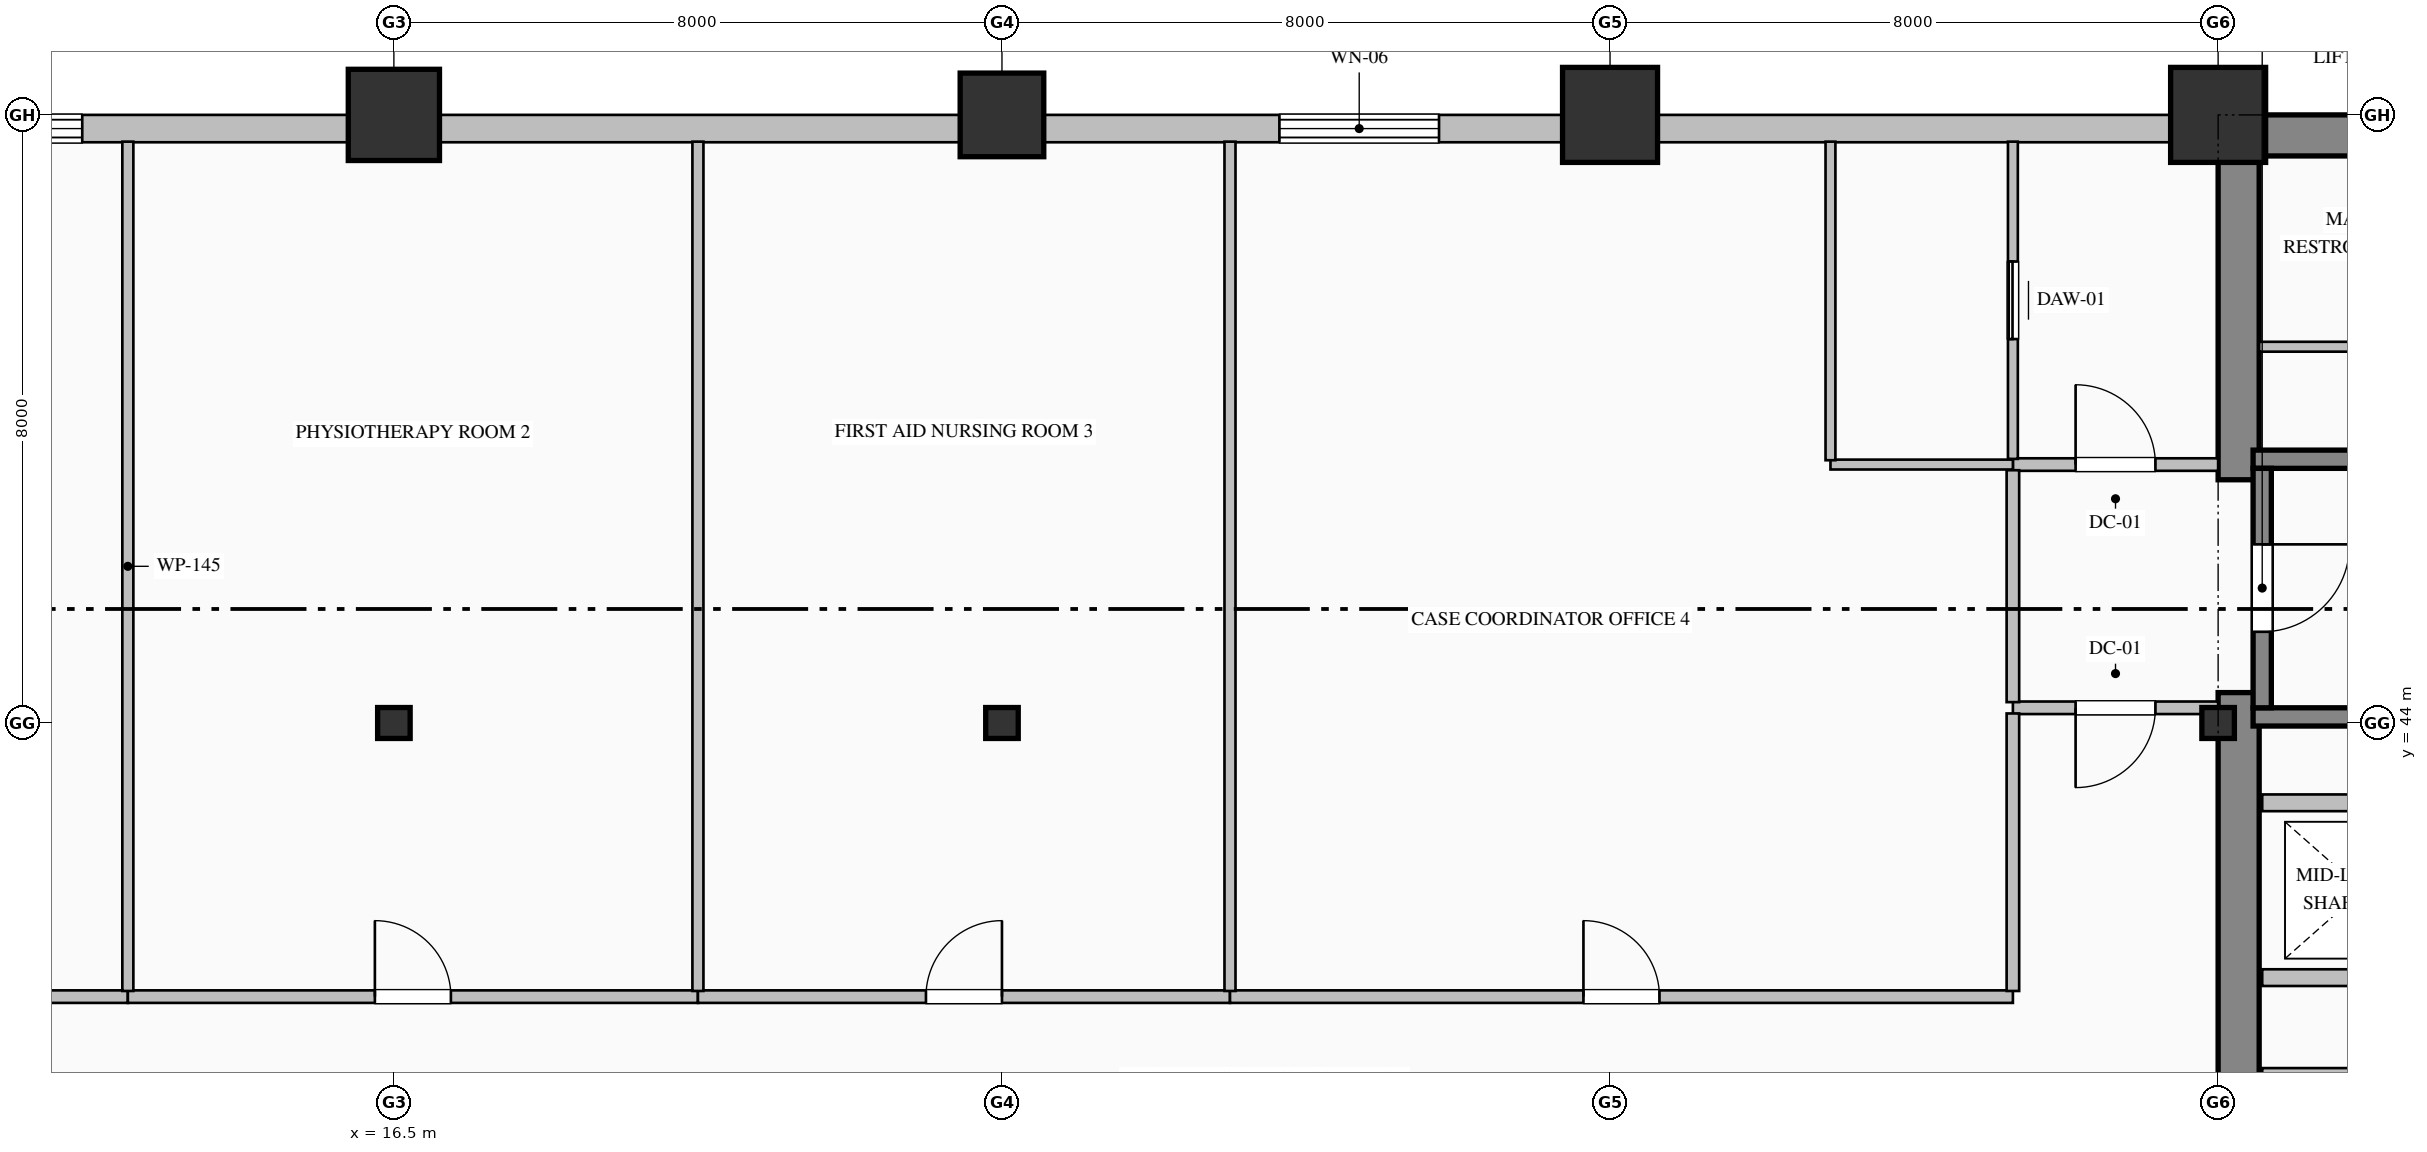
"""IFC4 building model, lengths in metres.
Left out: names, types, materials, properties, quantities, classifications, styles, units other than length and angle.
Written with IfcOpenShell. Run it as: python <this file> out.ifc"""

import sys

from ifc_helpers import new_model, si_unit, direction, frame, frame_2d, origin, origin_2d, place, context, subcontext, project, spatial, rectangle, hollow_rectangle, hollow_circle, i_section, extrude, element, fill, save


model = new_model("IFC4")
c1 = context("Model", 3, precision=1e-05, world=origin(), true_north=direction((0.0, 1.0)))
c2 = subcontext(c1, "Body", "Model", "MODEL_VIEW")
j1 = project(units=[si_unit("LENGTHUNIT", "METRE"), si_unit("PLANEANGLEUNIT", "RADIAN")], contexts=[c1])
p1 = place(None, origin())
s1 = spatial("IfcSite", under=j1, at=p1, CompositionType="ELEMENT")
p2 = place(p1, origin())
s2 = spatial("IfcBuilding", under=s1, at=p2, CompositionType="ELEMENT")
p3 = place(p2, frame((0.0, 0.0, 84.2)))
s3 = spatial("IfcBuildingStorey", under=s2, at=p3, CompositionType="ELEMENT", Elevation=84.2)
p4 = place(p3, frame((40.5, 51.73, 0.0), z_axis=(0.0, 0.0, 1.0), x_axis=(1.0, 0.0, 0.0)))
e1 = element("IfcWall", 1, at=p4, inside=s3, PredefinedType="SHEAR", context=c2, shape_type="SweptSolid", body=[
    extrude(rectangle(XDim=23.5, YDim=0.54, at=frame_2d((11.75, 0.0))), origin(), (0.0, 0.0, 1.0), 3.75),
])
p5 = place(p3, frame((40.77, 36.54, 0.0), z_axis=(0.0, 0.0, 1.0), x_axis=(0.0, 1.0, 0.0)))
e2 = element("IfcWall", 2, at=p5, inside=s3, PredefinedType="SHEAR", context=c2, shape_type="SweptSolid", body=[
    extrude(rectangle(XDim=7.86, YDim=0.54, at=frame_2d((3.93, 0.0))), origin(), (0.0, 0.0, 1.0), 3.75),
])
p6 = place(p3, frame((40.77, 47.2, 0.0), z_axis=(0.0, 0.0, 1.0), x_axis=(0.0, 1.0, 0.0)))
e3 = element("IfcWall", 3, at=p6, inside=s3, PredefinedType="SHEAR", context=c2, shape_type="SweptSolid", body=[
    extrude(rectangle(XDim=4.26, YDim=0.54, at=frame_2d((2.13, 0.0))), origin(), (0.0, 0.0, 1.0), 3.75),
])
p7 = place(p3, frame((16.5, 44.0, 0.0), z_axis=(0.0, 0.0, 1.0), x_axis=(1.0, 0.0, 0.0)))
e4 = element("IfcColumn", 4, at=p7, inside=s3, PredefinedType="COLUMN", context=c2, shape_type="SweptSolid", body=[
    extrude(i_section(OverallWidth=0.407, OverallDepth=0.428, WebThickness=0.02, FlangeThickness=0.035, FilletRadius=0.022, at=origin_2d()), origin(), (0.0, 0.0, 1.0), 4.0),
])
p8 = place(p3, frame((16.5, 52.0, 0.0), z_axis=(0.0, 0.0, 1.0), x_axis=(1.0, 0.0, 0.0)))
e5 = element("IfcColumn", 5, at=p8, inside=s3, PredefinedType="COLUMN", context=c2, shape_type="SweptSolid", body=[
    extrude(hollow_circle(Radius=0.6, WallThickness=0.04, at=origin_2d()), origin(), (0.0, 0.0, 1.0), 4.0),
])
p9 = place(p3, frame((24.5, 44.0, 0.0), z_axis=(0.0, 0.0, 1.0), x_axis=(1.0, 0.0, 0.0)))
e6 = element("IfcColumn", 6, at=p9, inside=s3, PredefinedType="COLUMN", context=c2, shape_type="SweptSolid", body=[
    extrude(i_section(OverallWidth=0.407, OverallDepth=0.428, WebThickness=0.02, FlangeThickness=0.035, FilletRadius=0.022, at=origin_2d()), origin(), (0.0, 0.0, 1.0), 4.0),
])
p10 = place(p3, frame((24.5, 52.0, 0.0), z_axis=(0.0, 0.0, 1.0), x_axis=(1.0, 0.0, 0.0)))
e7 = element("IfcColumn", 7, at=p10, inside=s3, PredefinedType="COLUMN", context=c2, shape_type="SweptSolid", body=[
    extrude(hollow_rectangle(XDim=1.1, YDim=1.1, WallThickness=0.04, at=origin_2d()), origin(), (0.0, 0.0, 1.0), 4.0),
])
p11 = place(p3, frame((32.5, 52.0, 0.0), z_axis=(0.0, 0.0, 1.0), x_axis=(1.0, 0.0, 0.0)))
e8 = element("IfcColumn", 8, at=p11, inside=s3, PredefinedType="COLUMN", context=c2, shape_type="SweptSolid", body=[
    extrude(hollow_rectangle(XDim=1.25, YDim=1.25, WallThickness=0.045, at=origin_2d()), origin(), (0.0, 0.0, 1.0), 4.0),
])
p12 = place(p3, frame((40.5, 44.0, 0.0), z_axis=(0.0, 0.0, 1.0), x_axis=(1.0, 0.0, 0.0)))
e9 = element("IfcColumn", 9, at=p12, inside=s3, PredefinedType="COLUMN", context=c2, shape_type="SweptSolid", body=[
    extrude(i_section(OverallWidth=0.407, OverallDepth=0.428, WebThickness=0.02, FlangeThickness=0.035, FilletRadius=0.022, at=origin_2d()), origin(), (0.0, 0.0, 1.0), 4.0),
])
p13 = place(p3, frame((40.5, 52.0, 0.0), z_axis=(0.0, 0.0, 1.0), x_axis=(1.0, 0.0, 0.0)))
e10 = element("IfcColumn", 10, at=p13, inside=s3, PredefinedType="COLUMN", context=c2, shape_type="SweptSolid", body=[
    extrude(hollow_rectangle(XDim=1.25, YDim=1.25, WallThickness=0.045, at=origin_2d()), origin(), (0.0, 0.0, 1.0), 4.0),
])
p14 = place(p3, frame((4.0, 51.82, 0.0), z_axis=(0.0, 0.0, 1.0), x_axis=(1.0, 0.0, 0.0)))
e11 = element("IfcWall", 11, at=p14, inside=s3, PredefinedType="SOLIDWALL", context=c2, shape_type="SweptSolid", body=[
    extrude(rectangle(XDim=36.52, YDim=0.36, at=frame_2d((18.26, 0.0))), origin(), (0.0, 0.0, 1.0), 3.25),
])
p15 = place(p14, frame((6.0, 0.0, 0.8)))
e12 = element("IfcOpeningElement", 12, at=p15, cuts=e11, PredefinedType="OPENING", context=c2, shape_type="SweptSolid", body=[
    extrude(rectangle(XDim=2.4, YDim=2.15, at=frame_2d((1.2, 1.075))), frame((0.0, 0.19, 0.0), z_axis=(0.0, -1.0, 0.0), x_axis=(1.0, 0.0, 0.0)), (0.0, 0.0, 1.0), 0.38),
])
p16 = place(p14, frame((24.15, 0.0, 0.85)))
e13 = element("IfcOpeningElement", 13, at=p16, cuts=e11, PredefinedType="OPENING", context=c2, shape_type="SweptSolid", body=[
    extrude(rectangle(XDim=2.1, YDim=2.05, at=frame_2d((1.05, 1.025))), frame((0.0, 0.19, 0.0), z_axis=(0.0, -1.0, 0.0), x_axis=(1.0, 0.0, 0.0)), (0.0, 0.0, 1.0), 0.38),
])
for number, where, z_axis, x_axis in (
    (14, (40.96, 47.47, 0.0), (0.0, 0.0, 1.0), (1.0, 0.0, 0.0)),
    (15, (49.04, 44.08, 0.0), (0.0, 0.0, 1.0), (-1.0, 0.0, 0.0)),
):
    element("IfcWall", number, at=place(p3, frame(where, z_axis=z_axis, x_axis=x_axis)), inside=s3, PredefinedType="SOLIDWALL", context=c2, shape_type="SweptSolid", body=[
        extrude(rectangle(XDim=8.08, YDim=0.24, at=frame_2d((4.04, 0.0))), origin(), (0.0, 0.0, 1.0), 4.0),
    ])
p17 = place(p3, frame((41.08, 47.35, 0.0), z_axis=(0.0, 0.0, 1.0), x_axis=(0.0, -1.0, 0.0)))
e16 = element("IfcWall", 16, at=p17, inside=s3, PredefinedType="SOLIDWALL", context=c2, shape_type="SweptSolid", body=[
    extrude(rectangle(XDim=3.15, YDim=0.24, at=frame_2d((1.575, 0.0))), origin(), (0.0, 0.0, 1.0), 4.0),
])
p18 = place(p17, frame((1.0, 0.0, 0.0)))
e17 = element("IfcOpeningElement", 17, at=p18, cuts=e16, PredefinedType="OPENING", context=c2, shape_type="SweptSolid", body=[
    extrude(rectangle(XDim=1.15, YDim=2.2, at=frame_2d((0.575, 1.1))), frame((0.0, 0.13, 0.0), z_axis=(0.0, -1.0, 0.0), x_axis=(1.0, 0.0, 0.0)), (0.0, 0.0, 1.0), 0.26),
])
for number, where, z_axis, x_axis in (
    (18, (41.08, 39.35, 0.0), (0.0, 0.0, 1.0), (1.0, 0.0, 0.0)),
    (19, (49.32, 40.65, 0.0), (0.0, 0.0, 1.0), (-1.0, 0.0, 0.0)),
    (20, (41.08, 42.95, 0.0), (0.0, 0.0, 1.0), (1.0, 0.0, 0.0)),
):
    element("IfcWall", number, at=place(p3, frame(where, z_axis=z_axis, x_axis=x_axis)), inside=s3, PredefinedType="PARTITIONING", context=c2, shape_type="SweptSolid", body=[
        extrude(rectangle(XDim=8.24, YDim=0.22, at=frame_2d((4.12, 0.0))), origin(), (0.0, 0.0, 1.0), 3.75),
    ])
p19 = place(p3, frame((37.8, 47.4, 0.0), z_axis=(0.0, 0.0, 1.0), x_axis=(1.0, 0.0, 0.0)))
e21 = element("IfcWall", 21, at=p19, inside=s3, PredefinedType="PARTITIONING", context=c2, shape_type="SweptSolid", body=[
    extrude(rectangle(XDim=2.7, YDim=0.165, at=frame_2d((1.35, 0.0))), origin(), (0.0, 0.0, 1.0), 3.75),
])
p20 = place(p19, frame((0.825, 0.0, 0.0)))
e22 = element("IfcOpeningElement", 22, at=p20, cuts=e21, PredefinedType="OPENING", context=c2, shape_type="SweptSolid", body=[
    extrude(rectangle(XDim=1.05, YDim=2.15, at=frame_2d((0.525, 1.075))), frame((0.0, 0.093, 0.0), z_axis=(0.0, -1.0, 0.0), x_axis=(1.0, 0.0, 0.0)), (0.0, 0.0, 1.0), 0.185),
])
p21 = place(p3, frame((40.5, 44.2, 0.0), z_axis=(0.0, 0.0, 1.0), x_axis=(-1.0, 0.0, 0.0)))
e23 = element("IfcWall", 23, at=p21, inside=s3, PredefinedType="PARTITIONING", context=c2, shape_type="SweptSolid", body=[
    extrude(rectangle(XDim=2.7, YDim=0.165, at=frame_2d((1.35, 0.0))), origin(), (0.0, 0.0, 1.0), 3.75),
])
p22 = place(p21, frame((0.825, 0.0, 0.0)))
e24 = element("IfcOpeningElement", 24, at=p22, cuts=e23, PredefinedType="OPENING", context=c2, shape_type="SweptSolid", body=[
    extrude(rectangle(XDim=1.05, YDim=2.15, at=frame_2d((0.525, 1.075))), frame((0.0, 0.093, 0.0), z_axis=(0.0, -1.0, 0.0), x_axis=(1.0, 0.0, 0.0)), (0.0, 0.0, 1.0), 0.185),
])
p23 = place(p3, frame((37.8, 44.274, 0.0), z_axis=(0.0, 0.0, 1.0), x_axis=(0.0, 1.0, 0.0)))
e25 = element("IfcWall", 25, at=p23, inside=s3, PredefinedType="PARTITIONING", context=c2, shape_type="SweptSolid", body=[
    extrude(rectangle(XDim=3.051, YDim=0.165, at=frame_2d((1.525, 0.0))), origin(), (0.0, 0.0, 1.0), 3.75),
])
p24 = place(p3, frame((37.8, 47.475, 0.0), z_axis=(0.0, 0.0, 1.0), x_axis=(0.0, 1.0, 0.0)))
e26 = element("IfcWall", 26, at=p24, inside=s3, PredefinedType="PARTITIONING", context=c2, shape_type="SweptSolid", body=[
    extrude(rectangle(XDim=4.173, YDim=0.13, at=frame_2d((2.087, 0.0))), origin(), (0.0, 0.0, 1.0), 3.75),
])
p25 = place(p24, frame((1.577, 0.0, 0.0)))
e27 = element("IfcOpeningElement", 27, at=p25, cuts=e26, PredefinedType="OPENING", context=c2, shape_type="SweptSolid", body=[
    extrude(rectangle(XDim=1.02, YDim=2.15, at=frame_2d((0.51, 1.075))), frame((0.0, 0.075, 0.0), z_axis=(0.0, -1.0, 0.0), x_axis=(1.0, 0.0, 0.0)), (0.0, 0.0, 1.0), 0.15),
])
p26 = place(p3, frame((37.8, 47.4, 0.0), z_axis=(0.0, 0.0, 1.0), x_axis=(-1.0, 0.0, 0.0)))
e28 = element("IfcWall", 28, at=p26, inside=s3, PredefinedType="PARTITIONING", context=c2, shape_type="SweptSolid", body=[
    extrude(rectangle(XDim=2.4, YDim=0.13, at=frame_2d((1.2, 0.0))), origin(), (0.0, 0.0, 1.0), 3.75),
])
p27 = place(p3, frame((35.4, 47.457, 0.0), z_axis=(0.0, 0.0, 1.0), x_axis=(0.0, 1.0, 0.0)))
e29 = element("IfcWall", 29, at=p27, inside=s3, PredefinedType="PARTITIONING", context=c2, shape_type="SweptSolid", body=[
    extrude(rectangle(XDim=4.191, YDim=0.13, at=frame_2d((2.095, 0.0))), origin(), (0.0, 0.0, 1.0), 3.75),
])
p28 = place(p3, frame((41.04, 48.95, 0.0), z_axis=(0.0, 0.0, 1.0), x_axis=(1.0, 0.0, 0.0)))
e30 = element("IfcWall", 30, at=p28, inside=s3, PredefinedType="PARTITIONING", context=c2, shape_type="SweptSolid", body=[
    extrude(rectangle(XDim=4.16, YDim=0.13, at=frame_2d((2.08, 0.0))), origin(), (0.0, 0.0, 1.0), 3.75),
])
p29 = place(p28, frame((1.62, 0.0, 0.0)))
e31 = element("IfcOpeningElement", 31, at=p29, cuts=e30, PredefinedType="OPENING", context=c2, shape_type="SweptSolid", body=[
    extrude(rectangle(XDim=0.92, YDim=2.15, at=frame_2d((0.46, 1.075))), frame((0.0, 0.075, 0.0), z_axis=(0.0, -1.0, 0.0), x_axis=(1.0, 0.0, 0.0)), (0.0, 0.0, 1.0), 0.15),
])
p30 = place(p3, frame((9.0, 40.4, 0.0), z_axis=(0.0, 0.0, 1.0), x_axis=(1.0, 0.0, 0.0)))
e32 = element("IfcWall", 32, at=p30, inside=s3, PredefinedType="PARTITIONING", context=c2, shape_type="SweptSolid", body=[
    extrude(rectangle(XDim=4.0, YDim=0.165, at=frame_2d((2.0, 0.0))), origin(), (0.0, 0.0, 1.0), 3.75),
])
p31 = place(p30, frame((1.5, 0.0, 0.0)))
e33 = element("IfcOpeningElement", 33, at=p31, cuts=e32, PredefinedType="OPENING", context=c2, shape_type="SweptSolid", body=[
    extrude(rectangle(XDim=1.0, YDim=2.15, at=frame_2d((0.5, 1.075))), frame((0.0, 0.093, 0.0), z_axis=(0.0, -1.0, 0.0), x_axis=(1.0, 0.0, 0.0)), (0.0, 0.0, 1.0), 0.185),
])
p32 = place(p3, frame((13.0, 40.4, 0.0), z_axis=(0.0, 0.0, 1.0), x_axis=(1.0, 0.0, 0.0)))
e34 = element("IfcWall", 34, at=p32, inside=s3, PredefinedType="PARTITIONING", context=c2, shape_type="SweptSolid", body=[
    extrude(rectangle(XDim=7.5, YDim=0.165, at=frame_2d((3.75, 0.0))), origin(), (0.0, 0.0, 1.0), 3.75),
])
p33 = place(p32, frame((3.25, 0.0, 0.0)))
e35 = element("IfcOpeningElement", 35, at=p33, cuts=e34, PredefinedType="OPENING", context=c2, shape_type="SweptSolid", body=[
    extrude(rectangle(XDim=1.0, YDim=2.15, at=frame_2d((0.5, 1.075))), frame((0.0, 0.093, 0.0), z_axis=(0.0, -1.0, 0.0), x_axis=(1.0, 0.0, 0.0)), (0.0, 0.0, 1.0), 0.185),
])
p34 = place(p3, frame((20.5, 40.4, 0.0), z_axis=(0.0, 0.0, 1.0), x_axis=(1.0, 0.0, 0.0)))
e36 = element("IfcWall", 36, at=p34, inside=s3, PredefinedType="PARTITIONING", context=c2, shape_type="SweptSolid", body=[
    extrude(rectangle(XDim=7.0, YDim=0.165, at=frame_2d((3.5, 0.0))), origin(), (0.0, 0.0, 1.0), 3.75),
])
p35 = place(p34, frame((3.0, 0.0, 0.0)))
e37 = element("IfcOpeningElement", 37, at=p35, cuts=e36, PredefinedType="OPENING", context=c2, shape_type="SweptSolid", body=[
    extrude(rectangle(XDim=1.0, YDim=2.15, at=frame_2d((0.5, 1.075))), frame((0.0, 0.093, 0.0), z_axis=(0.0, -1.0, 0.0), x_axis=(1.0, 0.0, 0.0)), (0.0, 0.0, 1.0), 0.185),
])
p36 = place(p3, frame((27.5, 40.4, 0.0), z_axis=(0.0, 0.0, 1.0), x_axis=(1.0, 0.0, 0.0)))
e38 = element("IfcWall", 38, at=p36, inside=s3, PredefinedType="PARTITIONING", context=c2, shape_type="SweptSolid", body=[
    extrude(rectangle(XDim=10.3, YDim=0.165, at=frame_2d((5.15, 0.0))), origin(), (0.0, 0.0, 1.0), 3.75),
])
p37 = place(p36, frame((4.65, 0.0, 0.0)))
e39 = element("IfcOpeningElement", 39, at=p37, cuts=e38, PredefinedType="OPENING", context=c2, shape_type="SweptSolid", body=[
    extrude(rectangle(XDim=1.0, YDim=2.15, at=frame_2d((0.5, 1.075))), frame((0.0, 0.093, 0.0), z_axis=(0.0, -1.0, 0.0), x_axis=(1.0, 0.0, 0.0)), (0.0, 0.0, 1.0), 0.185),
])
p38 = place(p3, frame((37.8, 40.475, 0.0), z_axis=(0.0, 0.0, 1.0), x_axis=(0.0, 1.0, 0.0)))
e40 = element("IfcWall", 40, at=p38, inside=s3, PredefinedType="PARTITIONING", context=c2, shape_type="SweptSolid", body=[
    extrude(rectangle(XDim=3.651, YDim=0.165, at=frame_2d((1.825, 0.0))), origin(), (0.0, 0.0, 1.0), 3.75),
])
for number, where, z_axis, x_axis in (
    (41, (13.0, 51.648, 0.0), (0.0, 0.0, 1.0), (0.0, -1.0, 0.0)),
    (42, (20.5, 51.648, 0.0), (0.0, 0.0, 1.0), (0.0, -1.0, 0.0)),
    (43, (27.5, 51.648, 0.0), (0.0, 0.0, 1.0), (0.0, -1.0, 0.0)),
):
    element("IfcWall", number, at=place(p3, frame(where, z_axis=z_axis, x_axis=x_axis)), inside=s3, PredefinedType="PARTITIONING", context=c2, shape_type="SweptSolid", body=[
        extrude(rectangle(XDim=11.173, YDim=0.145, at=frame_2d((5.587, 0.0))), origin(), (0.0, 0.0, 1.0), 3.75),
    ])
p39 = place(p15, origin())
e44 = element("IfcWindow", 44, at=p39, inside=s3, PartitioningType="TRIPLE_PANEL_VERTICAL", PredefinedType="WINDOW", context=c2, shape_type="SweptSolid", body=[
    extrude(rectangle(XDim=2.4, YDim=2.15, at=frame_2d((1.2, 1.075))), frame((0.0, 0.15, 0.0), z_axis=(0.0, -1.0, 0.0), x_axis=(1.0, 0.0, 0.0)), (0.0, 0.0, 1.0), 0.06),
])
fill(e12, e44)
p40 = place(p16, origin())
e45 = element("IfcWindow", 45, at=p40, inside=s3, PartitioningType="TRIPLE_PANEL_VERTICAL", PredefinedType="WINDOW", context=c2, shape_type="SweptSolid", body=[
    extrude(rectangle(XDim=2.1, YDim=2.05, at=frame_2d((1.05, 1.025))), frame((0.0, 0.15, 0.0), z_axis=(0.0, -1.0, 0.0), x_axis=(1.0, 0.0, 0.0)), (0.0, 0.0, 1.0), 0.06),
])
fill(e13, e45)
p41 = place(p18, origin())
e46 = element("IfcDoor", 46, at=p41, inside=s3, OperationType="SINGLE_SWING_LEFT", PredefinedType="DOOR", context=c2, shape_type="SweptSolid", body=[
    extrude(rectangle(XDim=1.15, YDim=2.2, at=frame_2d((0.575, 1.1))), frame((0.0, 0.025, 0.0), z_axis=(0.0, -1.0, 0.0), x_axis=(1.0, 0.0, 0.0)), (0.0, 0.0, 1.0), 0.05),
])
fill(e17, e46)
p42 = place(p20, origin())
e47 = element("IfcDoor", 47, at=p42, inside=s3, OperationType="SINGLE_SWING_LEFT", PredefinedType="DOOR", context=c2, shape_type="SweptSolid", body=[
    extrude(rectangle(XDim=1.05, YDim=2.15, at=frame_2d((0.525, 1.075))), frame((0.0, 0.025, 0.0), z_axis=(0.0, -1.0, 0.0), x_axis=(1.0, 0.0, 0.0)), (0.0, 0.0, 1.0), 0.05),
])
fill(e22, e47)
p43 = place(p22, origin())
e48 = element("IfcDoor", 48, at=p43, inside=s3, OperationType="SINGLE_SWING_RIGHT", PredefinedType="DOOR", context=c2, shape_type="SweptSolid", body=[
    extrude(rectangle(XDim=1.05, YDim=2.15, at=frame_2d((0.525, 1.075))), frame((0.0, 0.025, 0.0), z_axis=(0.0, -1.0, 0.0), x_axis=(1.0, 0.0, 0.0)), (0.0, 0.0, 1.0), 0.05),
])
fill(e24, e48)
p44 = place(p25, origin())
e49 = element("IfcDoor", 49, at=p44, inside=s3, OperationType="SLIDING_TO_LEFT", PredefinedType="DOOR", context=c2, shape_type="SweptSolid", body=[
    extrude(rectangle(XDim=1.02, YDim=2.15, at=frame_2d((0.51, 1.075))), frame((0.0, 0.025, 0.0), z_axis=(0.0, -1.0, 0.0), x_axis=(1.0, 0.0, 0.0)), (0.0, 0.0, 1.0), 0.05),
])
fill(e27, e49)
p45 = place(p33, origin())
e50 = element("IfcDoor", 50, at=p45, inside=s3, OperationType="SINGLE_SWING_LEFT", PredefinedType="DOOR", context=c2, shape_type="SweptSolid", body=[
    extrude(rectangle(XDim=1.0, YDim=2.15, at=frame_2d((0.5, 1.075))), frame((0.0, 0.025, 0.0), z_axis=(0.0, -1.0, 0.0), x_axis=(1.0, 0.0, 0.0)), (0.0, 0.0, 1.0), 0.05),
])
fill(e35, e50)
p46 = place(p35, origin())
e51 = element("IfcDoor", 51, at=p46, inside=s3, OperationType="SINGLE_SWING_RIGHT", PredefinedType="DOOR", context=c2, shape_type="SweptSolid", body=[
    extrude(rectangle(XDim=1.0, YDim=2.15, at=frame_2d((0.5, 1.075))), frame((0.0, 0.025, 0.0), z_axis=(0.0, -1.0, 0.0), x_axis=(1.0, 0.0, 0.0)), (0.0, 0.0, 1.0), 0.05),
])
fill(e37, e51)
p47 = place(p37, origin())
e52 = element("IfcDoor", 52, at=p47, inside=s3, OperationType="SINGLE_SWING_LEFT", PredefinedType="DOOR", context=c2, shape_type="SweptSolid", body=[
    extrude(rectangle(XDim=1.0, YDim=2.15, at=frame_2d((0.5, 1.075))), frame((0.0, 0.025, 0.0), z_axis=(0.0, -1.0, 0.0), x_axis=(1.0, 0.0, 0.0)), (0.0, 0.0, 1.0), 0.05),
])
fill(e39, e52)
save(model, sys.argv[1])
